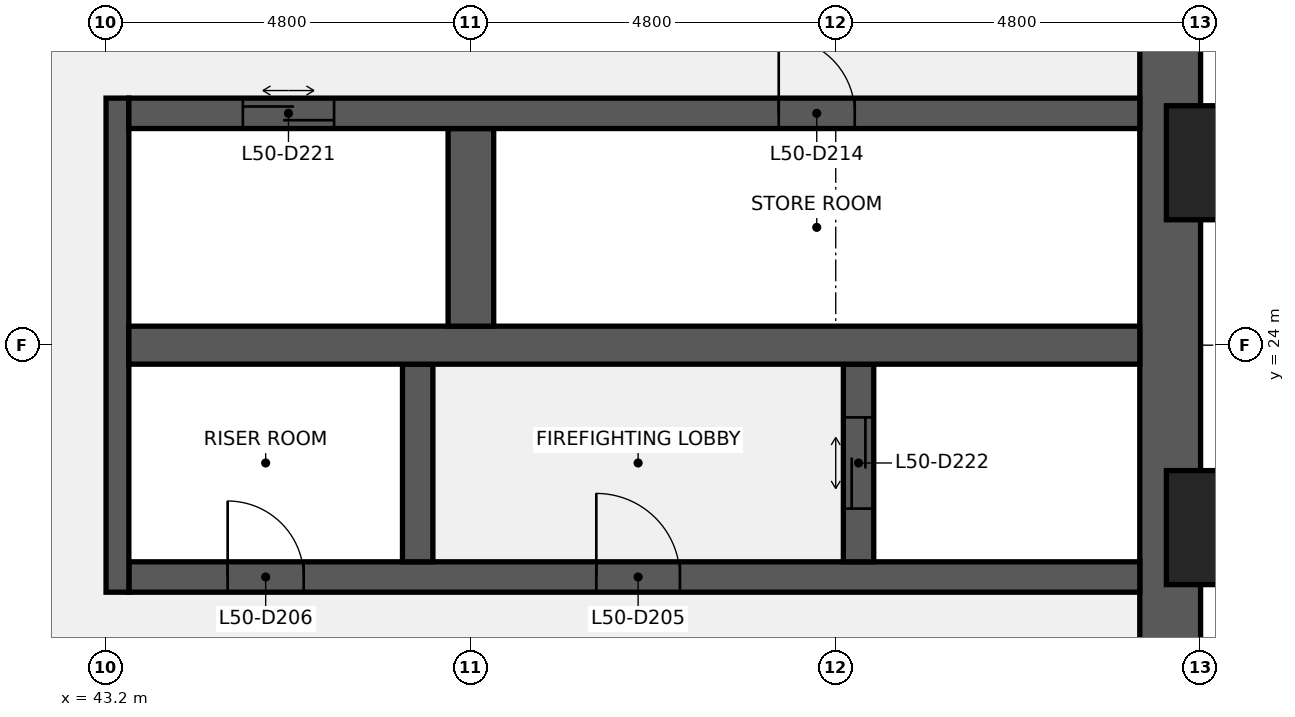
"""IFC4 building model, lengths in metres.
Left out: names, types, materials, properties, quantities, classifications, styles, units other than length and angle.
Written with IfcOpenShell. Run it as: python <this file> out.ifc"""

import sys

from ifc_helpers import new_model, si_unit, direction, frame, frame_2d, origin, origin_2d, place, context, subcontext, project, spatial, rectangle, extrude, element, fill, save


model = new_model("IFC4")
c1 = context("Model", 3, precision=1e-05, world=origin(), true_north=direction((0.0, 1.0)))
c2 = subcontext(c1, "Body", "Model", "MODEL_VIEW")
j1 = project(units=[si_unit("LENGTHUNIT", "METRE"), si_unit("PLANEANGLEUNIT", "RADIAN")], contexts=[c1])
p1 = place(None, origin())
s1 = spatial("IfcSite", under=j1, at=p1, CompositionType="ELEMENT")
p2 = place(p1, origin())
s2 = spatial("IfcBuilding", under=s1, at=p2, CompositionType="ELEMENT")
p3 = place(p2, frame((0.0, 0.0, 229.2)))
s3 = spatial("IfcBuildingStorey", under=s2, at=p3, CompositionType="ELEMENT", Elevation=229.2)
p4 = place(p3, frame((57.2, 38.4, 0.0), z_axis=(0.0, 0.0, 1.0), x_axis=(0.0, -1.0, 0.0)))
e1 = element("IfcWall", 1, at=p4, inside=s3, PredefinedType="SHEAR", context=c2, shape_type="SweptSolid", body=[
    extrude(rectangle(XDim=28.8, YDim=0.8, at=frame_2d((14.4, 0.0))), origin(), (0.0, 0.0, 1.0), 3.84),
])
p5 = place(p4, frame((18.45, 0.0, 0.9)))
e2 = element("IfcOpeningElement", 2, at=p5, cuts=e1, PredefinedType="OPENING", context=c2, shape_type="SweptSolid", body=[
    extrude(rectangle(XDim=1.5, YDim=1.5, at=frame_2d((0.75, 0.75))), frame((0.0, 0.41, 0.0), z_axis=(0.0, -1.0, 0.0), x_axis=(1.0, 0.0, 0.0)), (0.0, 0.0, 1.0), 0.82),
])
p6 = place(p4, frame((8.85, 0.0, 0.9)))
e3 = element("IfcOpeningElement", 3, at=p6, cuts=e1, PredefinedType="OPENING", context=c2, shape_type="SweptSolid", body=[
    extrude(rectangle(XDim=1.5, YDim=1.5, at=frame_2d((0.75, 0.75))), frame((0.0, 0.41, 0.0), z_axis=(0.0, -1.0, 0.0), x_axis=(1.0, 0.0, 0.0)), (0.0, 0.0, 1.0), 0.82),
])
p7 = place(p3, frame((43.5, 20.95, 0.0), z_axis=(0.0, 0.0, 1.0), x_axis=(1.0, 0.0, 0.0)))
e4 = element("IfcWall", 4, at=p7, inside=s3, PredefinedType="SHEAR", context=c2, shape_type="SweptSolid", body=[
    extrude(rectangle(XDim=13.3, YDim=0.4, at=frame_2d((6.65, 0.0))), origin(), (0.0, 0.0, 1.0), 3.84),
])
p8 = place(p7, frame((6.15, 0.0, 0.0)))
e5 = element("IfcOpeningElement", 5, at=p8, cuts=e4, PredefinedType="OPENING", context=c2, shape_type="SweptSolid", body=[
    extrude(rectangle(XDim=1.1, YDim=2.1, at=frame_2d((0.55, 1.05))), frame((0.0, 0.21, 0.0), z_axis=(0.0, -1.0, 0.0), x_axis=(1.0, 0.0, 0.0)), (0.0, 0.0, 1.0), 0.42),
])
p9 = place(p7, frame((1.3, 0.0, 0.0)))
e6 = element("IfcOpeningElement", 6, at=p9, cuts=e4, PredefinedType="OPENING", context=c2, shape_type="SweptSolid", body=[
    extrude(rectangle(XDim=1.0, YDim=2.1, at=frame_2d((0.5, 1.05))), frame((0.0, 0.21, 0.0), z_axis=(0.0, -1.0, 0.0), x_axis=(1.0, 0.0, 0.0)), (0.0, 0.0, 1.0), 0.42),
])
p10 = place(p3, frame((43.35, 20.75, 0.0), z_axis=(0.0, 0.0, 1.0), x_axis=(0.0, 1.0, 0.0)))
e7 = element("IfcWall", 7, at=p10, inside=s3, PredefinedType="SHEAR", context=c2, shape_type="SweptSolid", body=[
    extrude(rectangle(XDim=6.5, YDim=0.3, at=frame_2d((3.25, 0.0))), origin(), (0.0, 0.0, 1.0), 3.84),
])
p11 = place(p3, frame((53.1, 21.15, 0.0), z_axis=(0.0, 0.0, 1.0), x_axis=(0.0, 1.0, 0.0)))
e8 = element("IfcWall", 8, at=p11, inside=s3, PredefinedType="SHEAR", context=c2, shape_type="SweptSolid", body=[
    extrude(rectangle(XDim=2.6, YDim=0.4, at=frame_2d((1.3, 0.0))), origin(), (0.0, 0.0, 1.0), 3.84),
])
p12 = place(p11, frame((0.7, 0.0, 0.0)))
e9 = element("IfcOpeningElement", 9, at=p12, cuts=e8, PredefinedType="OPENING", context=c2, shape_type="SweptSolid", body=[
    extrude(rectangle(XDim=1.2, YDim=2.1, at=frame_2d((0.6, 1.05))), frame((0.0, 0.21, 0.0), z_axis=(0.0, -1.0, 0.0), x_axis=(1.0, 0.0, 0.0)), (0.0, 0.0, 1.0), 0.42),
])
p13 = place(p3, frame((47.3, 21.15, 0.0), z_axis=(0.0, 0.0, 1.0), x_axis=(0.0, 1.0, 0.0)))
e10 = element("IfcWall", 10, at=p13, inside=s3, PredefinedType="SHEAR", context=c2, shape_type="SweptSolid", body=[
    extrude(rectangle(XDim=2.6, YDim=0.4, at=frame_2d((1.3, 0.0))), origin(), (0.0, 0.0, 1.0), 3.84),
])
p14 = place(p3, frame((43.5, 24.0, 0.0), z_axis=(0.0, 0.0, 1.0), x_axis=(1.0, 0.0, 0.0)))
e11 = element("IfcWall", 11, at=p14, inside=s3, PredefinedType="SHEAR", context=c2, shape_type="SweptSolid", body=[
    extrude(rectangle(XDim=13.3, YDim=0.5, at=frame_2d((6.65, 0.0))), origin(), (0.0, 0.0, 1.0), 3.84),
])
p15 = place(p3, frame((48.0, 24.25, 0.0), z_axis=(0.0, 0.0, 1.0), x_axis=(0.0, 1.0, 0.0)))
e12 = element("IfcWall", 12, at=p15, inside=s3, PredefinedType="SHEAR", context=c2, shape_type="SweptSolid", body=[
    extrude(rectangle(XDim=2.6, YDim=0.6, at=frame_2d((1.3, 0.0))), origin(), (0.0, 0.0, 1.0), 3.84),
])
p16 = place(p3, frame((43.5, 27.05, 0.0), z_axis=(0.0, 0.0, 1.0), x_axis=(1.0, 0.0, 0.0)))
e13 = element("IfcWall", 13, at=p16, inside=s3, PredefinedType="SHEAR", context=c2, shape_type="SweptSolid", body=[
    extrude(rectangle(XDim=13.3, YDim=0.4, at=frame_2d((6.65, 0.0))), origin(), (0.0, 0.0, 1.0), 3.84),
])
p17 = place(p16, frame((8.55, 0.0, 0.0)))
e14 = element("IfcOpeningElement", 14, at=p17, cuts=e13, PredefinedType="OPENING", context=c2, shape_type="SweptSolid", body=[
    extrude(rectangle(XDim=1.0, YDim=2.1, at=frame_2d((0.5, 1.05))), frame((0.0, 0.21, 0.0), z_axis=(0.0, -1.0, 0.0), x_axis=(1.0, 0.0, 0.0)), (0.0, 0.0, 1.0), 0.42),
])
p18 = place(p16, frame((1.5, 0.0, 0.0)))
e15 = element("IfcOpeningElement", 15, at=p18, cuts=e13, PredefinedType="OPENING", context=c2, shape_type="SweptSolid", body=[
    extrude(rectangle(XDim=1.2, YDim=2.1, at=frame_2d((0.6, 1.05))), frame((0.0, 0.21, 0.0), z_axis=(0.0, -1.0, 0.0), x_axis=(1.0, 0.0, 0.0)), (0.0, 0.0, 1.0), 0.42),
])
for number, where, z_axis, x_axis in (
    (16, (58.35, 21.6, 0.0), (0.0, 0.0, 1.0), (0.0, 1.0, 0.0)),
    (17, (58.35, 26.4, 0.0), (0.0, 0.0, 1.0), (0.0, 1.0, 0.0)),
):
    element("IfcColumn", number, at=place(p3, frame(where, z_axis=z_axis, x_axis=x_axis)), inside=s3, PredefinedType="PILASTER", context=c2, shape_type="SweptSolid", body=[
        extrude(rectangle(XDim=2.4, YDim=1.5, at=origin_2d()), origin(), (0.0, 0.0, 1.0), 4.0),
    ])
p19 = place(p8, origin())
e18 = element("IfcDoor", 18, at=p19, inside=s3, OperationType="SINGLE_SWING_LEFT", PredefinedType="DOOR", context=c2, shape_type="SweptSolid", body=[
    extrude(rectangle(XDim=1.1, YDim=2.1, at=frame_2d((0.55, 1.05))), frame((0.0, 0.025, 0.0), z_axis=(0.0, -1.0, 0.0), x_axis=(1.0, 0.0, 0.0)), (0.0, 0.0, 1.0), 0.05),
])
fill(e5, e18)
p20 = place(p9, origin())
e19 = element("IfcDoor", 19, at=p20, inside=s3, OperationType="SINGLE_SWING_LEFT", PredefinedType="DOOR", context=c2, shape_type="SweptSolid", body=[
    extrude(rectangle(XDim=1.0, YDim=2.1, at=frame_2d((0.5, 1.05))), frame((0.0, 0.025, 0.0), z_axis=(0.0, -1.0, 0.0), x_axis=(1.0, 0.0, 0.0)), (0.0, 0.0, 1.0), 0.05),
])
fill(e6, e19)
p21 = place(p17, origin())
e20 = element("IfcDoor", 20, at=p21, inside=s3, OperationType="SINGLE_SWING_LEFT", PredefinedType="DOOR", context=c2, shape_type="SweptSolid", body=[
    extrude(rectangle(XDim=1.0, YDim=2.1, at=frame_2d((0.5, 1.05))), frame((0.0, 0.025, 0.0), z_axis=(0.0, -1.0, 0.0), x_axis=(1.0, 0.0, 0.0)), (0.0, 0.0, 1.0), 0.05),
])
fill(e14, e20)
p22 = place(p18, origin())
e21 = element("IfcDoor", 21, at=p22, inside=s3, OperationType="DOUBLE_DOOR_SLIDING", PredefinedType="DOOR", context=c2, shape_type="SweptSolid", body=[
    extrude(rectangle(XDim=1.2, YDim=2.1, at=frame_2d((0.6, 1.05))), frame((0.0, 0.025, 0.0), z_axis=(0.0, -1.0, 0.0), x_axis=(1.0, 0.0, 0.0)), (0.0, 0.0, 1.0), 0.05),
])
fill(e15, e21)
p23 = place(p12, origin())
e22 = element("IfcDoor", 22, at=p23, inside=s3, OperationType="DOUBLE_DOOR_SLIDING", PredefinedType="DOOR", context=c2, shape_type="SweptSolid", body=[
    extrude(rectangle(XDim=1.2, YDim=2.1, at=frame_2d((0.6, 1.05))), frame((0.0, 0.025, 0.0), z_axis=(0.0, -1.0, 0.0), x_axis=(1.0, 0.0, 0.0)), (0.0, 0.0, 1.0), 0.05),
])
fill(e9, e22)
save(model, sys.argv[1])
